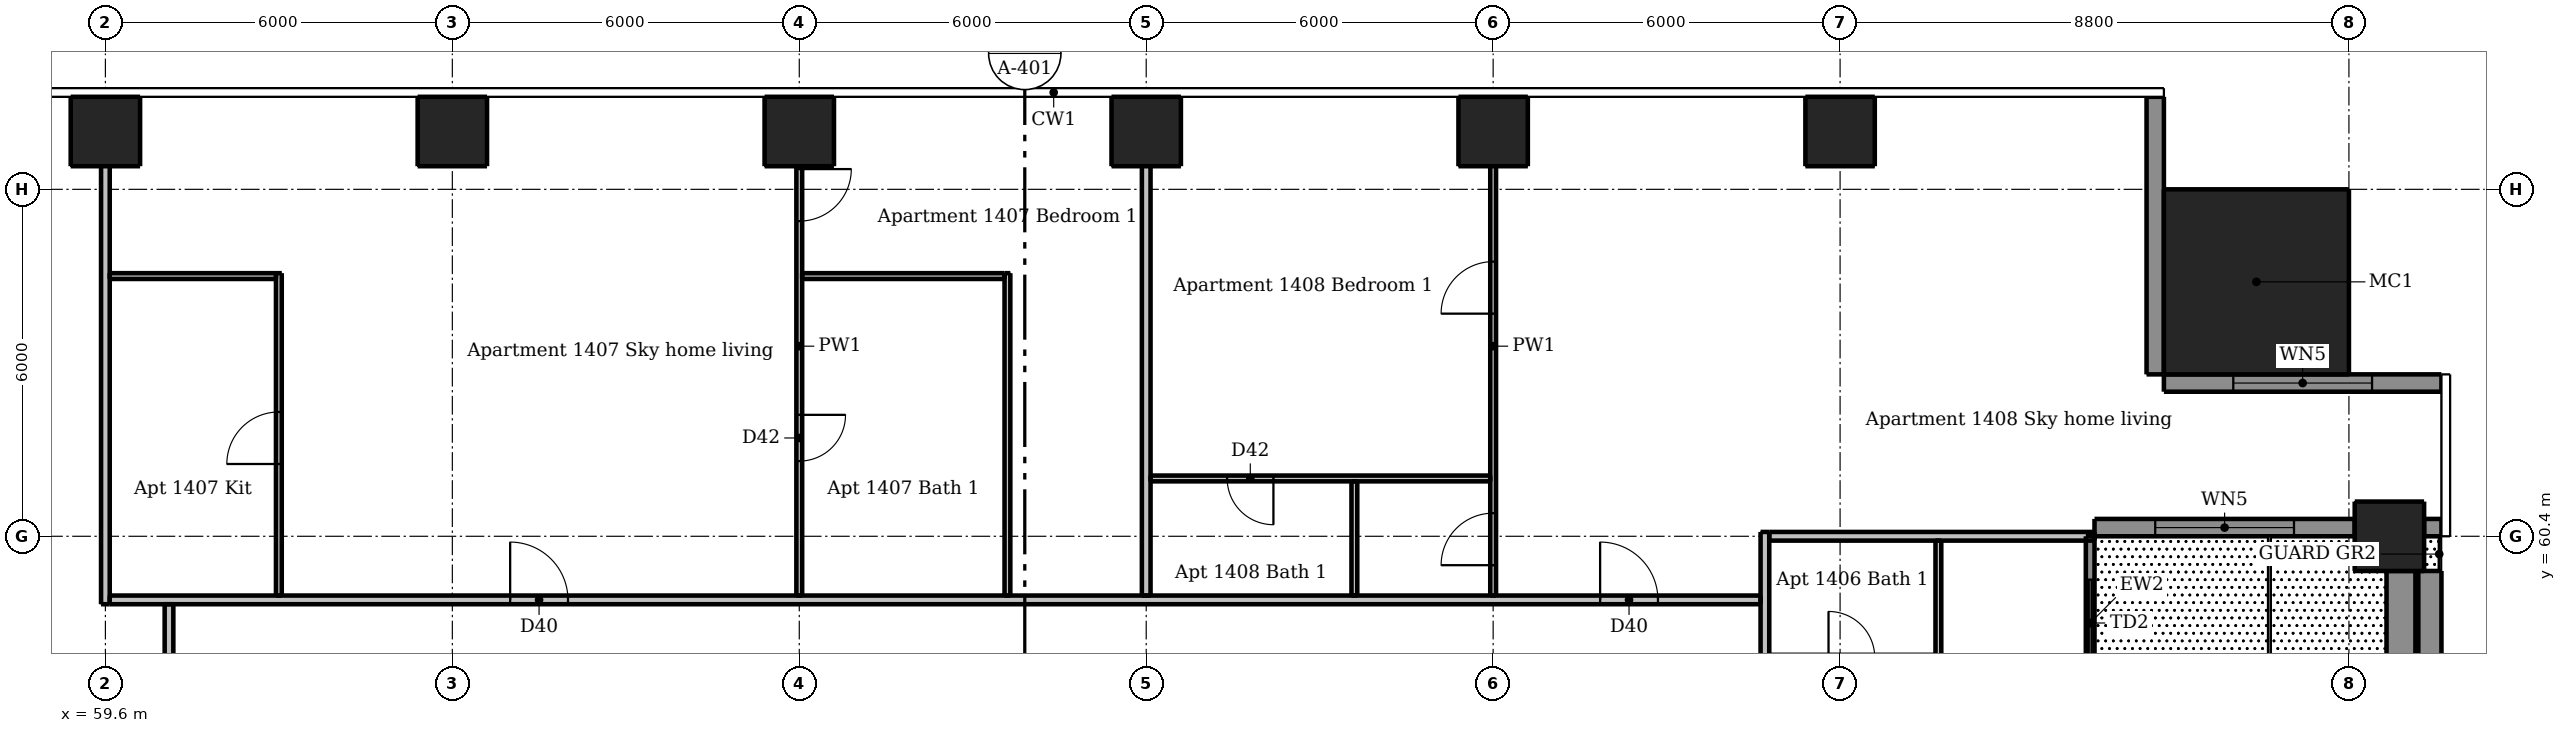
"""IFC4 building model, lengths in metres.
Left out: names, types, materials, properties, quantities, classifications, styles, units other than length and angle.
Written with IfcOpenShell. Run it as: python <this file> out.ifc"""

import sys

from ifc_helpers import new_model, si_unit, direction, frame, frame_2d, origin, origin_2d, place, context, subcontext, project, spatial, rectangle, extrude, element, fill, save


model = new_model("IFC4")
c1 = context("Model", 3, precision=1e-05, world=origin(), true_north=direction((0.0, 1.0)))
c2 = subcontext(c1, "Body", "Model", "MODEL_VIEW")
j1 = project(units=[si_unit("LENGTHUNIT", "METRE"), si_unit("PLANEANGLEUNIT", "RADIAN")], contexts=[c1])
p1 = place(None, origin())
s1 = spatial("IfcSite", under=j1, at=p1, CompositionType="ELEMENT")
p2 = place(p1, origin())
s2 = spatial("IfcBuilding", under=s1, at=p2, CompositionType="ELEMENT")
p3 = place(p2, frame((0.0, 0.0, 53.2)))
s3 = spatial("IfcBuildingStorey", under=s2, at=p3, CompositionType="ELEMENT", Elevation=53.2)
for number, where, z_axis, x_axis in (
    (1, (99.1, 60.4, 0.0), (0.0, 0.0, 1.0), (1.0, 0.0, 0.0)),
    (2, (59.6, 67.4, 0.0), (0.0, 0.0, 1.0), (1.0, 0.0, 0.0)),
    (3, (65.6, 67.4, 0.0), (0.0, 0.0, 1.0), (1.0, 0.0, 0.0)),
    (4, (71.6, 67.4, 0.0), (0.0, 0.0, 1.0), (1.0, 0.0, 0.0)),
    (5, (77.6, 67.4, 0.0), (0.0, 0.0, 1.0), (1.0, 0.0, 0.0)),
    (6, (83.6, 67.4, 0.0), (0.0, 0.0, 1.0), (1.0, 0.0, 0.0)),
    (7, (89.6, 67.4, 0.0), (0.0, 0.0, 1.0), (1.0, 0.0, 0.0)),
):
    element("IfcColumn", number, at=place(p3, frame(where, z_axis=z_axis, x_axis=x_axis)), inside=s3, PredefinedType="COLUMN", context=c2, shape_type="SweptSolid", body=[
        extrude(rectangle(XDim=1.2, YDim=1.2, at=origin_2d()), origin(), (0.0, 0.0, 1.0), 3.05),
    ])
p4 = place(p3, frame((96.8, 64.8, 0.0), z_axis=(0.0, 0.0, 1.0), x_axis=(1.0, 0.0, 0.0)))
e8 = element("IfcColumn", 8, at=p4, inside=s3, PredefinedType="COLUMN", context=c2, shape_type="SweptSolid", body=[
    extrude(rectangle(XDim=3.2, YDim=3.2, at=origin_2d()), origin(), (0.0, 0.0, 1.0), 3.3),
])
p5 = place(p3, frame((94.0, 60.55, 0.0), z_axis=(0.0, 0.0, 1.0), x_axis=(1.0, 0.0, 0.0)))
e9 = element("IfcWall", 9, at=p5, inside=s3, PredefinedType="SOLIDWALL", context=c2, shape_type="SweptSolid", body=[
    extrude(rectangle(XDim=4.5, YDim=0.3, at=frame_2d((2.25, 0.0))), origin(), (0.0, 0.0, 1.0), 3.05),
])
p6 = place(p5, frame((1.05, 0.0, 0.15)))
e10 = element("IfcOpeningElement", 10, at=p6, cuts=e9, PredefinedType="OPENING", context=c2, shape_type="SweptSolid", body=[
    extrude(rectangle(XDim=2.4, YDim=2.1, at=frame_2d((1.2, 1.05))), frame((0.0, 0.16, 0.0), z_axis=(0.0, -1.0, 0.0), x_axis=(1.0, 0.0, 0.0)), (0.0, 0.0, 1.0), 0.32),
])
p7 = place(p3, frame((99.7, 60.55, 0.0), z_axis=(0.0, 0.0, 1.0), x_axis=(1.0, 0.0, 0.0)))
e11 = element("IfcWall", 11, at=p7, inside=s3, PredefinedType="SOLIDWALL", context=c2, shape_type="SweptSolid", body=[
    extrude(rectangle(XDim=0.3, YDim=0.3, at=frame_2d((0.15, 0.0))), origin(), (0.0, 0.0, 1.0), 3.05),
])
p8 = place(p3, frame((100.0, 63.05, 0.0), z_axis=(0.0, 0.0, 1.0), x_axis=(-1.0, 0.0, 0.0)))
e12 = element("IfcWall", 12, at=p8, inside=s3, PredefinedType="SOLIDWALL", context=c2, shape_type="SweptSolid", body=[
    extrude(rectangle(XDim=4.8, YDim=0.3, at=frame_2d((2.4, 0.0))), origin(), (0.0, 0.0, 1.0), 3.05),
])
p9 = place(p8, frame((1.2, 0.0, 0.15)))
e13 = element("IfcOpeningElement", 13, at=p9, cuts=e12, PredefinedType="OPENING", context=c2, shape_type="SweptSolid", body=[
    extrude(rectangle(XDim=2.4, YDim=2.1, at=frame_2d((1.2, 1.05))), frame((0.0, 0.16, 0.0), z_axis=(0.0, -1.0, 0.0), x_axis=(1.0, 0.0, 0.0)), (0.0, 0.0, 1.0), 0.32),
])
p10 = place(p3, frame((95.05, 63.2, 0.0), z_axis=(0.0, 0.0, 1.0), x_axis=(0.0, 1.0, 0.0)))
e14 = element("IfcWall", 14, at=p10, inside=s3, PredefinedType="SOLIDWALL", context=c2, shape_type="SweptSolid", body=[
    extrude(rectangle(XDim=4.8, YDim=0.3, at=frame_2d((2.4, 0.0))), origin(), (0.0, 0.0, 1.0), 3.05),
])
p11 = place(p3, frame((93.925, 57.4, 0.0), z_axis=(0.0, 0.0, 1.0), x_axis=(0.0, 1.0, 0.0)))
e15 = element("IfcWall", 15, at=p11, inside=s3, PredefinedType="SOLIDWALL", context=c2, shape_type="SweptSolid", body=[
    extrude(rectangle(XDim=3.0, YDim=0.15, at=frame_2d((1.5, 0.0))), origin(), (0.0, 0.0, 1.0), 3.05),
])
p12 = place(p11, frame((0.75, 0.0, 0.0)))
e16 = element("IfcOpeningElement", 16, at=p12, cuts=e15, PredefinedType="OPENING", context=c2, shape_type="SweptSolid", body=[
    extrude(rectangle(XDim=1.5, YDim=2.4, at=frame_2d((0.75, 1.2))), frame((0.0, 0.085, 0.0), z_axis=(0.0, -1.0, 0.0), x_axis=(1.0, 0.0, 0.0)), (0.0, 0.0, 1.0), 0.17),
])
p13 = place(p3, frame((99.8, 54.4, 0.03), z_axis=(0.0, 0.0, 1.0), x_axis=(0.0, 1.0, 0.0)))
e17 = element("IfcWall", 17, at=p13, inside=s3, PredefinedType="PARAPET", context=c2, shape_type="SweptSolid", body=[
    extrude(rectangle(XDim=5.4, YDim=0.4, at=frame_2d((2.7, 0.0))), origin(), (0.0, 0.0, 1.0), 1.1),
])
p14 = place(p3, frame((99.3, 55.0, 0.03), z_axis=(0.0, 0.0, 1.0), x_axis=(0.0, 1.0, 0.0)))
e18 = element("IfcWall", 18, at=p14, inside=s3, PredefinedType="SOLIDWALL", context=c2, shape_type="SweptSolid", body=[
    extrude(rectangle(XDim=4.8, YDim=0.5, at=frame_2d((2.4, 0.0))), origin(), (0.0, 0.0, 1.0), 0.6),
])
p15 = place(p3, frame((62.6, 59.375, 0.0), z_axis=(0.0, 0.0, 1.0), x_axis=(0.0, 1.0, 0.0)))
e19 = element("IfcWall", 19, at=p15, inside=s3, PredefinedType="PARTITIONING", context=c2, shape_type="SweptSolid", body=[
    extrude(rectangle(XDim=5.575, YDim=0.1, at=frame_2d((2.788, 0.0))), origin(), (0.0, 0.0, 1.0), 3.05),
])
p16 = place(p15, frame((2.275, 0.0, 0.0)))
e20 = element("IfcOpeningElement", 20, at=p16, cuts=e19, PredefinedType="OPENING", context=c2, shape_type="SweptSolid", body=[
    extrude(rectangle(XDim=0.9, YDim=2.1, at=frame_2d((0.45, 1.05))), frame((0.0, 0.06, 0.0), z_axis=(0.0, -1.0, 0.0), x_axis=(1.0, 0.0, 0.0)), (0.0, 0.0, 1.0), 0.12),
])
p17 = place(p3, frame((71.6, 68.0, 0.0), z_axis=(0.0, 0.0, 1.0), x_axis=(0.0, -1.0, 0.0)))
e21 = element("IfcWall", 21, at=p17, inside=s3, PredefinedType="PARTITIONING", context=c2, shape_type="SweptSolid", body=[
    extrude(rectangle(XDim=8.625, YDim=0.1, at=frame_2d((4.312, 0.0))), origin(), (0.0, 0.0, 1.0), 2.516),
])
p18 = place(p17, frame((1.25, 0.0, 0.0)))
e22 = element("IfcOpeningElement", 22, at=p18, cuts=e21, PredefinedType="OPENING", context=c2, shape_type="SweptSolid", body=[
    extrude(rectangle(XDim=0.9, YDim=2.1, at=frame_2d((0.45, 1.05))), frame((0.0, 0.06, 0.0), z_axis=(0.0, -1.0, 0.0), x_axis=(1.0, 0.0, 0.0)), (0.0, 0.0, 1.0), 0.12),
])
p19 = place(p17, frame((5.5, 0.0, 0.0)))
e23 = element("IfcOpeningElement", 23, at=p19, cuts=e21, PredefinedType="OPENING", context=c2, shape_type="SweptSolid", body=[
    extrude(rectangle(XDim=0.8, YDim=2.1, at=frame_2d((0.4, 1.05))), frame((0.0, 0.06, 0.0), z_axis=(0.0, -1.0, 0.0), x_axis=(1.0, 0.0, 0.0)), (0.0, 0.0, 1.0), 0.12),
])
p20 = place(p3, frame((75.2, 59.375, 0.0), z_axis=(0.0, 0.0, 1.0), x_axis=(0.0, 1.0, 0.0)))
e24 = element("IfcWall", 24, at=p20, inside=s3, PredefinedType="PARTITIONING", context=c2, shape_type="SweptSolid", body=[
    extrude(rectangle(XDim=5.575, YDim=0.1, at=frame_2d((2.788, 0.0))), origin(), (0.0, 0.0, 1.0), 3.05),
])
p21 = place(p3, frame((81.2, 59.375, 0.0), z_axis=(0.0, 0.0, 1.0), x_axis=(0.0, 1.0, 0.0)))
e25 = element("IfcWall", 25, at=p21, inside=s3, PredefinedType="PARTITIONING", context=c2, shape_type="SweptSolid", body=[
    extrude(rectangle(XDim=1.975, YDim=0.1, at=frame_2d((0.988, 0.0))), origin(), (0.0, 0.0, 1.0), 3.05),
])
p22 = place(p3, frame((83.6, 59.375, 0.0), z_axis=(0.0, 0.0, 1.0), x_axis=(0.0, 1.0, 0.0)))
e26 = element("IfcWall", 26, at=p22, inside=s3, PredefinedType="PARTITIONING", context=c2, shape_type="SweptSolid", body=[
    extrude(rectangle(XDim=8.625, YDim=0.1, at=frame_2d((4.312, 0.0))), origin(), (0.0, 0.0, 1.0), 2.516),
])
p23 = place(p22, frame((0.525, 0.0, 0.0)))
e27 = element("IfcOpeningElement", 27, at=p23, cuts=e26, PredefinedType="OPENING", context=c2, shape_type="SweptSolid", body=[
    extrude(rectangle(XDim=0.9, YDim=2.1, at=frame_2d((0.45, 1.05))), frame((0.0, 0.06, 0.0), z_axis=(0.0, -1.0, 0.0), x_axis=(1.0, 0.0, 0.0)), (0.0, 0.0, 1.0), 0.12),
])
p24 = place(p22, frame((4.875, 0.0, 0.0)))
e28 = element("IfcOpeningElement", 28, at=p24, cuts=e26, PredefinedType="OPENING", context=c2, shape_type="SweptSolid", body=[
    extrude(rectangle(XDim=0.9, YDim=2.1, at=frame_2d((0.45, 1.05))), frame((0.0, 0.06, 0.0), z_axis=(0.0, -1.0, 0.0), x_axis=(1.0, 0.0, 0.0)), (0.0, 0.0, 1.0), 0.12),
])
p25 = place(p3, frame((91.3, 58.25, 0.0), z_axis=(0.0, 0.0, 1.0), x_axis=(0.0, 1.0, 0.0)))
e29 = element("IfcWall", 29, at=p25, inside=s3, PredefinedType="PARTITIONING", context=c2, shape_type="SweptSolid", body=[
    extrude(rectangle(XDim=2.075, YDim=0.1, at=frame_2d((1.038, 0.0))), origin(), (0.0, 0.0, 1.0), 3.05),
])
p26 = place(p3, frame((59.675, 64.9, 0.0), z_axis=(0.0, 0.0, 1.0), x_axis=(1.0, 0.0, 0.0)))
e30 = element("IfcWall", 30, at=p26, inside=s3, PredefinedType="PARTITIONING", context=c2, shape_type="SweptSolid", body=[
    extrude(rectangle(XDim=2.875, YDim=0.1, at=frame_2d((1.438, 0.0))), origin(), (0.0, 0.0, 1.0), 3.05),
])
p27 = place(p3, frame((71.65, 64.9, 0.0), z_axis=(0.0, 0.0, 1.0), x_axis=(1.0, 0.0, 0.0)))
e31 = element("IfcWall", 31, at=p27, inside=s3, PredefinedType="PARTITIONING", context=c2, shape_type="SweptSolid", body=[
    extrude(rectangle(XDim=3.5, YDim=0.1, at=frame_2d((1.75, 0.0))), origin(), (0.0, 0.0, 1.0), 3.05),
])
p28 = place(p3, frame((83.55, 61.4, 0.0), z_axis=(0.0, 0.0, 1.0), x_axis=(-1.0, 0.0, 0.0)))
e32 = element("IfcWall", 32, at=p28, inside=s3, PredefinedType="PARTITIONING", context=c2, shape_type="SweptSolid", body=[
    extrude(rectangle(XDim=5.875, YDim=0.1, at=frame_2d((2.938, 0.0))), origin(), (0.0, 0.0, 1.0), 3.05),
])
p29 = place(p28, frame((3.75, 0.0, 0.0)))
e33 = element("IfcOpeningElement", 33, at=p29, cuts=e32, PredefinedType="OPENING", context=c2, shape_type="SweptSolid", body=[
    extrude(rectangle(XDim=0.8, YDim=2.1, at=frame_2d((0.4, 1.05))), frame((0.0, 0.06, 0.0), z_axis=(0.0, -1.0, 0.0), x_axis=(1.0, 0.0, 0.0)), (0.0, 0.0, 1.0), 0.12),
])
p30 = place(p3, frame((59.6, 59.225, 0.0), z_axis=(0.0, 0.0, 1.0), x_axis=(0.0, 1.0, 0.0)))
e34 = element("IfcWall", 34, at=p30, inside=s3, PredefinedType="PARTITIONING", context=c2, shape_type="SweptSolid", body=[
    extrude(rectangle(XDim=8.775, YDim=0.15, at=frame_2d((4.387, 0.0))), origin(), (0.0, 0.0, 1.0), 2.51),
])
p31 = place(p3, frame((60.7, 30.325, 0.0), z_axis=(0.0, 0.0, 1.0), x_axis=(0.0, 1.0, 0.0)))
e35 = element("IfcWall", 35, at=p31, inside=s3, PredefinedType="PARTITIONING", context=c2, shape_type="SweptSolid", body=[
    extrude(rectangle(XDim=28.9, YDim=0.15, at=frame_2d((14.45, 0.0))), origin(), (0.0, 0.0, 1.0), 3.05),
])
p32 = place(p31, frame((9.225, 0.0, 0.0)))
e36 = element("IfcOpeningElement", 36, at=p32, cuts=e35, PredefinedType="OPENING", context=c2, shape_type="SweptSolid", body=[
    extrude(rectangle(XDim=1.0, YDim=2.1, at=frame_2d((0.5, 1.05))), frame((0.0, 0.085, 0.0), z_axis=(0.0, -1.0, 0.0), x_axis=(1.0, 0.0, 0.0)), (0.0, 0.0, 1.0), 0.17),
])
p33 = place(p31, frame((26.025, 0.0, 0.0)))
e37 = element("IfcOpeningElement", 37, at=p33, cuts=e35, PredefinedType="OPENING", context=c2, shape_type="SweptSolid", body=[
    extrude(rectangle(XDim=1.0, YDim=2.1, at=frame_2d((0.5, 1.05))), frame((0.0, 0.085, 0.0), z_axis=(0.0, -1.0, 0.0), x_axis=(1.0, 0.0, 0.0)), (0.0, 0.0, 1.0), 0.17),
])
p34 = place(p3, frame((77.6, 59.375, 0.0), z_axis=(0.0, 0.0, 1.0), x_axis=(0.0, 1.0, 0.0)))
e38 = element("IfcWall", 38, at=p34, inside=s3, PredefinedType="PARTITIONING", context=c2, shape_type="SweptSolid", body=[
    extrude(rectangle(XDim=8.625, YDim=0.15, at=frame_2d((4.312, 0.0))), origin(), (0.0, 0.0, 1.0), 2.516),
])
p35 = place(p3, frame((88.3, 60.475, 0.0), z_axis=(0.0, 0.0, 1.0), x_axis=(0.0, -1.0, 0.0)))
e39 = element("IfcWall", 39, at=p35, inside=s3, PredefinedType="PARTITIONING", context=c2, shape_type="SweptSolid", body=[
    extrude(rectangle(XDim=28.7, YDim=0.15, at=frame_2d((14.35, 0.0))), origin(), (0.0, 0.0, 1.0), 3.05),
])
p36 = place(p35, frame((27.425, 0.0, 0.0)))
e40 = element("IfcOpeningElement", 40, at=p36, cuts=e39, PredefinedType="OPENING", context=c2, shape_type="SweptSolid", body=[
    extrude(rectangle(XDim=1.0, YDim=2.1, at=frame_2d((0.5, 1.05))), frame((0.0, 0.085, 0.0), z_axis=(0.0, -1.0, 0.0), x_axis=(1.0, 0.0, 0.0)), (0.0, 0.0, 1.0), 0.17),
])
p37 = place(p35, frame((11.575, 0.0, 0.0)))
e41 = element("IfcOpeningElement", 41, at=p37, cuts=e39, PredefinedType="OPENING", context=c2, shape_type="SweptSolid", body=[
    extrude(rectangle(XDim=1.0, YDim=2.1, at=frame_2d((0.5, 1.05))), frame((0.0, 0.085, 0.0), z_axis=(0.0, -1.0, 0.0), x_axis=(1.0, 0.0, 0.0)), (0.0, 0.0, 1.0), 0.17),
])
p38 = place(p35, frame((2.575, 0.0, 0.0)))
e42 = element("IfcOpeningElement", 42, at=p38, cuts=e39, PredefinedType="OPENING", context=c2, shape_type="SweptSolid", body=[
    extrude(rectangle(XDim=1.0, YDim=2.1, at=frame_2d((0.5, 1.05))), frame((0.0, 0.085, 0.0), z_axis=(0.0, -1.0, 0.0), x_axis=(1.0, 0.0, 0.0)), (0.0, 0.0, 1.0), 0.17),
])
p39 = place(p3, frame((88.375, 60.4, 0.0), z_axis=(0.0, 0.0, 1.0), x_axis=(1.0, 0.0, 0.0)))
e43 = element("IfcWall", 43, at=p39, inside=s3, PredefinedType="PARTITIONING", context=c2, shape_type="SweptSolid", body=[
    extrude(rectangle(XDim=5.625, YDim=0.15, at=frame_2d((2.812, 0.0))), origin(), (0.0, 0.0, 1.0), 2.516),
])
p40 = place(p3, frame((59.675, 59.3, 0.0), z_axis=(0.0, 0.0, 1.0), x_axis=(1.0, 0.0, 0.0)))
e44 = element("IfcWall", 44, at=p40, inside=s3, PredefinedType="PARTITIONING", context=c2, shape_type="SweptSolid", body=[
    extrude(rectangle(XDim=28.55, YDim=0.15, at=frame_2d((14.275, 0.0))), origin(), (0.0, 0.0, 1.0), 3.05),
])
p41 = place(p40, frame((6.925, 0.0, 0.0)))
e45 = element("IfcOpeningElement", 45, at=p41, cuts=e44, PredefinedType="OPENING", context=c2, shape_type="SweptSolid", body=[
    extrude(rectangle(XDim=1.0, YDim=2.1, at=frame_2d((0.5, 1.05))), frame((0.0, 0.085, 0.0), z_axis=(0.0, -1.0, 0.0), x_axis=(1.0, 0.0, 0.0)), (0.0, 0.0, 1.0), 0.17),
])
p42 = place(p40, frame((25.775, 0.0, 0.0)))
e46 = element("IfcOpeningElement", 46, at=p42, cuts=e44, PredefinedType="OPENING", context=c2, shape_type="SweptSolid", body=[
    extrude(rectangle(XDim=1.0, YDim=2.1, at=frame_2d((0.5, 1.05))), frame((0.0, 0.085, 0.0), z_axis=(0.0, -1.0, 0.0), x_axis=(1.0, 0.0, 0.0)), (0.0, 0.0, 1.0), 0.17),
])
p43 = place(p6, origin())
e47 = element("IfcWindow", 47, at=p43, inside=s3, PartitioningType="DOUBLE_PANEL_VERTICAL", PredefinedType="WINDOW", context=c2, shape_type="SweptSolid", body=[
    extrude(rectangle(XDim=2.4, YDim=2.1, at=frame_2d((1.2, 1.05))), frame((0.0, 0.03, 0.0), z_axis=(0.0, -1.0, 0.0), x_axis=(1.0, 0.0, 0.0)), (0.0, 0.0, 1.0), 0.06),
])
fill(e10, e47)
p44 = place(p9, origin())
e48 = element("IfcWindow", 48, at=p44, inside=s3, PartitioningType="DOUBLE_PANEL_VERTICAL", PredefinedType="WINDOW", context=c2, shape_type="SweptSolid", body=[
    extrude(rectangle(XDim=2.4, YDim=2.1, at=frame_2d((1.2, 1.05))), frame((0.0, 0.03, 0.0), z_axis=(0.0, -1.0, 0.0), x_axis=(1.0, 0.0, 0.0)), (0.0, 0.0, 1.0), 0.06),
])
fill(e13, e48)
p45 = place(p12, origin())
e49 = element("IfcDoor", 49, at=p45, inside=s3, OperationType="DOUBLE_DOOR_SLIDING", PredefinedType="DOOR", context=c2, shape_type="SweptSolid", body=[
    extrude(rectangle(XDim=1.5, YDim=2.4, at=frame_2d((0.75, 1.2))), frame((0.0, 0.025, 0.0), z_axis=(0.0, -1.0, 0.0), x_axis=(1.0, 0.0, 0.0)), (0.0, 0.0, 1.0), 0.05),
])
fill(e16, e49)
p46 = place(p41, origin())
e50 = element("IfcDoor", 50, at=p46, inside=s3, OperationType="SINGLE_SWING_LEFT", PredefinedType="DOOR", context=c2, shape_type="SweptSolid", body=[
    extrude(rectangle(XDim=1.0, YDim=2.1, at=frame_2d((0.5, 1.05))), frame((0.0, 0.025, 0.0), z_axis=(0.0, -1.0, 0.0), x_axis=(1.0, 0.0, 0.0)), (0.0, 0.0, 1.0), 0.05),
])
fill(e45, e50)
p47 = place(p16, origin())
e51 = element("IfcDoor", 51, at=p47, inside=s3, OperationType="SINGLE_SWING_LEFT", PredefinedType="DOOR", context=c2, shape_type="SweptSolid", body=[
    extrude(rectangle(XDim=0.9, YDim=2.1, at=frame_2d((0.45, 1.05))), frame((0.0, 0.025, 0.0), z_axis=(0.0, -1.0, 0.0), x_axis=(1.0, 0.0, 0.0)), (0.0, 0.0, 1.0), 0.05),
])
fill(e20, e51)
p48 = place(p18, origin())
e52 = element("IfcDoor", 52, at=p48, inside=s3, OperationType="SINGLE_SWING_LEFT", PredefinedType="DOOR", context=c2, shape_type="SweptSolid", body=[
    extrude(rectangle(XDim=0.9, YDim=2.1, at=frame_2d((0.45, 1.05))), frame((0.0, 0.025, 0.0), z_axis=(0.0, -1.0, 0.0), x_axis=(1.0, 0.0, 0.0)), (0.0, 0.0, 1.0), 0.05),
])
fill(e22, e52)
p49 = place(p19, origin())
e53 = element("IfcDoor", 53, at=p49, inside=s3, OperationType="SINGLE_SWING_LEFT", PredefinedType="DOOR", context=c2, shape_type="SweptSolid", body=[
    extrude(rectangle(XDim=0.8, YDim=2.1, at=frame_2d((0.4, 1.05))), frame((0.0, 0.025, 0.0), z_axis=(0.0, -1.0, 0.0), x_axis=(1.0, 0.0, 0.0)), (0.0, 0.0, 1.0), 0.05),
])
fill(e23, e53)
p50 = place(p42, origin())
e54 = element("IfcDoor", 54, at=p50, inside=s3, OperationType="SINGLE_SWING_LEFT", PredefinedType="DOOR", context=c2, shape_type="SweptSolid", body=[
    extrude(rectangle(XDim=1.0, YDim=2.1, at=frame_2d((0.5, 1.05))), frame((0.0, 0.025, 0.0), z_axis=(0.0, -1.0, 0.0), x_axis=(1.0, 0.0, 0.0)), (0.0, 0.0, 1.0), 0.05),
])
fill(e46, e54)
p51 = place(p23, origin())
e55 = element("IfcDoor", 55, at=p51, inside=s3, OperationType="SINGLE_SWING_LEFT", PredefinedType="DOOR", context=c2, shape_type="SweptSolid", body=[
    extrude(rectangle(XDim=0.9, YDim=2.1, at=frame_2d((0.45, 1.05))), frame((0.0, 0.025, 0.0), z_axis=(0.0, -1.0, 0.0), x_axis=(1.0, 0.0, 0.0)), (0.0, 0.0, 1.0), 0.05),
])
fill(e27, e55)
p52 = place(p24, origin())
e56 = element("IfcDoor", 56, at=p52, inside=s3, OperationType="SINGLE_SWING_LEFT", PredefinedType="DOOR", context=c2, shape_type="SweptSolid", body=[
    extrude(rectangle(XDim=0.9, YDim=2.1, at=frame_2d((0.45, 1.05))), frame((0.0, 0.025, 0.0), z_axis=(0.0, -1.0, 0.0), x_axis=(1.0, 0.0, 0.0)), (0.0, 0.0, 1.0), 0.05),
])
fill(e28, e56)
p53 = place(p29, origin())
e57 = element("IfcDoor", 57, at=p53, inside=s3, OperationType="SINGLE_SWING_LEFT", PredefinedType="DOOR", context=c2, shape_type="SweptSolid", body=[
    extrude(rectangle(XDim=0.8, YDim=2.1, at=frame_2d((0.4, 1.05))), frame((0.0, 0.025, 0.0), z_axis=(0.0, -1.0, 0.0), x_axis=(1.0, 0.0, 0.0)), (0.0, 0.0, 1.0), 0.05),
])
fill(e33, e57)
save(model, sys.argv[1])
